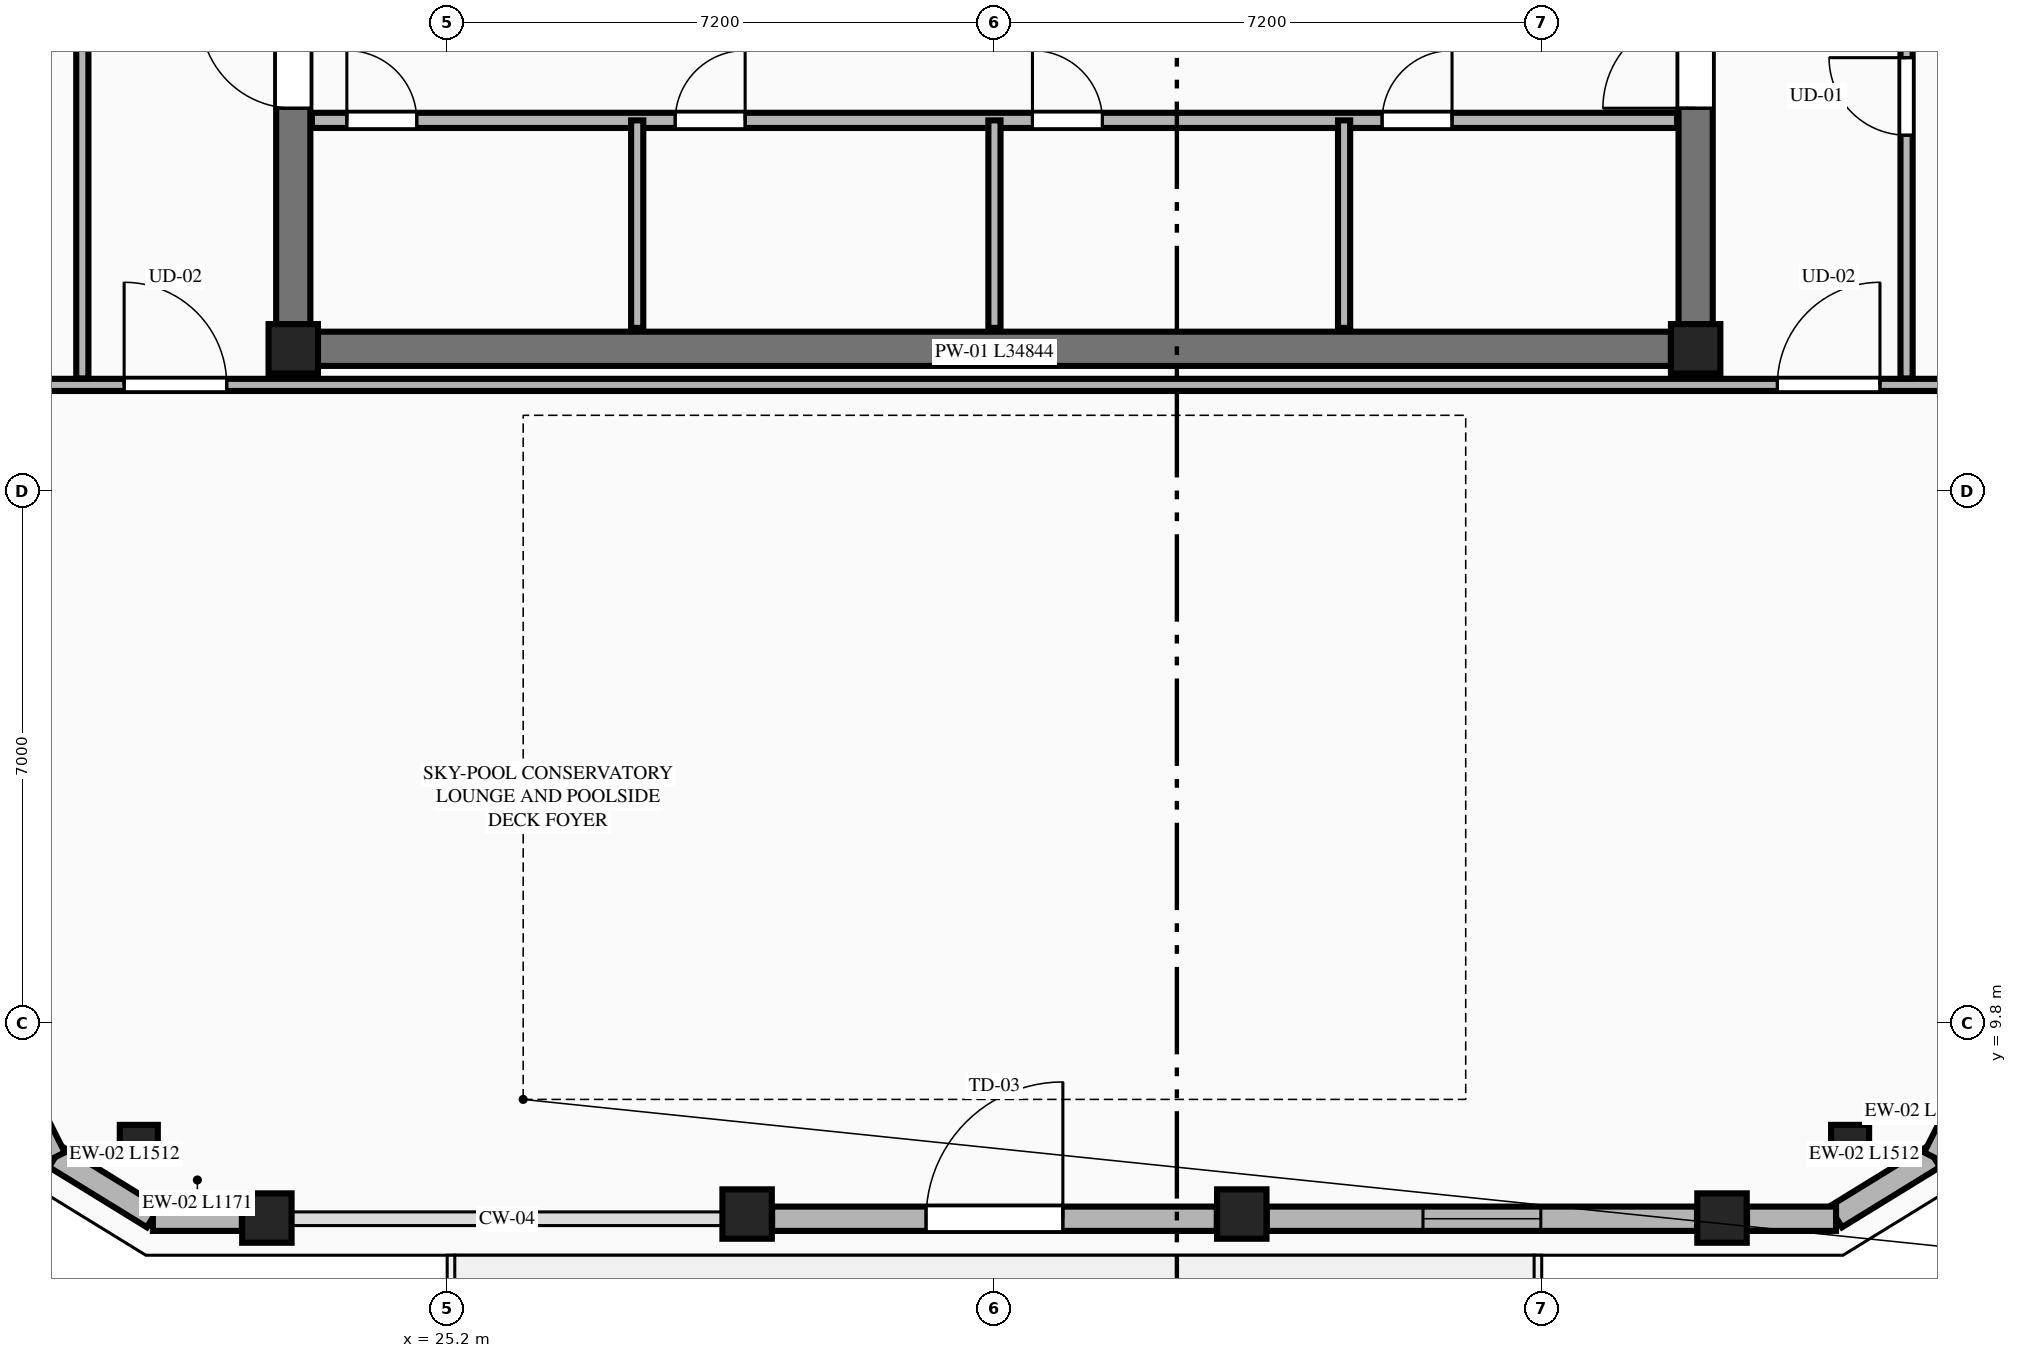
"""IFC4 building model, lengths in metres.
Left out: names, types, materials, properties, quantities, classifications, styles, units other than length and angle.
Written with IfcOpenShell. Run it as: python <this file> out.ifc"""

import sys

from ifc_helpers import new_model, si_unit, direction, frame, frame_2d, origin, origin_2d, place, context, subcontext, project, spatial, rectangle, extrude, element, fill, save


model = new_model("IFC4")
c1 = context("Model", 3, precision=1e-05, world=origin(), true_north=direction((0.0, 1.0)))
c2 = subcontext(c1, "Body", "Model", "MODEL_VIEW")
j1 = project(units=[si_unit("LENGTHUNIT", "METRE"), si_unit("PLANEANGLEUNIT", "RADIAN")], contexts=[c1])
p1 = place(None, origin())
s1 = spatial("IfcSite", under=j1, at=p1, CompositionType="ELEMENT")
p2 = place(p1, origin())
s2 = spatial("IfcBuilding", under=s1, at=p2, CompositionType="ELEMENT")
p3 = place(p2, frame((0.0, 0.0, 278.1)))
s3 = spatial("IfcBuildingStorey", under=s2, at=p3, CompositionType="ELEMENT", Elevation=278.1)
for number, where, z_axis, x_axis in (
    (1, (23.175, 18.675, 0.0), (0.0, 0.0, 1.0), (1.0, 0.0, 0.0)),
    (2, (41.625, 18.675, 0.0), (0.0, 0.0, 1.0), (1.0, 0.0, 0.0)),
):
    element("IfcColumn", number, at=place(p3, frame(where, z_axis=z_axis, x_axis=x_axis)), inside=s3, PredefinedType="COLUMN", context=c2, shape_type="SweptSolid", body=[
        extrude(rectangle(XDim=0.65, YDim=0.65, at=origin_2d()), origin(), (0.0, 0.0, 1.0), 5.4),
    ])
p4 = place(p3, frame((23.5, 18.675, 0.0), z_axis=(0.0, 0.0, 1.0), x_axis=(1.0, 0.0, 0.0)))
e3 = element("IfcWall", 3, at=p4, inside=s3, PredefinedType="SHEAR", context=c2, shape_type="SweptSolid", body=[
    extrude(rectangle(XDim=17.8, YDim=0.45, at=frame_2d((8.9, 0.0))), origin(), (0.0, 0.0, 1.0), 5.2),
])
p5 = place(p3, frame((23.175, 19.0, 0.0), z_axis=(0.0, 0.0, 1.0), x_axis=(0.0, 1.0, 0.0)))
e4 = element("IfcWall", 4, at=p5, inside=s3, PredefinedType="SHEAR", context=c2, shape_type="SweptSolid", body=[
    extrude(rectangle(XDim=13.8, YDim=0.45, at=frame_2d((6.9, 0.0))), origin(), (0.0, 0.0, 1.0), 5.2),
])
p6 = place(p5, frame((2.84, 0.0, 0.0)))
e5 = element("IfcOpeningElement", 5, at=p6, cuts=e4, PredefinedType="OPENING", context=c2, shape_type="SweptSolid", body=[
    extrude(rectangle(XDim=1.22, YDim=2.25, at=frame_2d((0.61, 1.125))), frame((0.0, 0.235, 0.0), z_axis=(0.0, -1.0, 0.0), x_axis=(1.0, 0.0, 0.0)), (0.0, 0.0, 1.0), 0.47),
])
p7 = place(p3, frame((41.625, 19.0, 0.0), z_axis=(0.0, 0.0, 1.0), x_axis=(0.0, 1.0, 0.0)))
e6 = element("IfcWall", 6, at=p7, inside=s3, PredefinedType="SHEAR", context=c2, shape_type="SweptSolid", body=[
    extrude(rectangle(XDim=13.8, YDim=0.45, at=frame_2d((6.9, 0.0))), origin(), (0.0, 0.0, 1.0), 5.2),
])
p8 = place(p7, frame((2.84, 0.0, 0.0)))
e7 = element("IfcOpeningElement", 7, at=p8, cuts=e6, PredefinedType="OPENING", context=c2, shape_type="SweptSolid", body=[
    extrude(rectangle(XDim=1.22, YDim=2.25, at=frame_2d((0.61, 1.125))), frame((0.0, 0.235, 0.0), z_axis=(0.0, -1.0, 0.0), x_axis=(1.0, 0.0, 0.0)), (0.0, 0.0, 1.0), 0.47),
])
for number, where, z_axis, x_axis in (
    (8, (22.828, 7.239, 0.0), (0.0, 0.0, 1.0), (1.0, 0.0, 0.0)),
    (9, (29.146, 7.292, 0.0), (0.0, 0.0, 1.0), (1.0, 0.0, 0.0)),
    (10, (35.654, 7.292, 0.0), (0.0, 0.0, 1.0), (1.0, 0.0, 0.0)),
    (11, (41.972, 7.239, 0.0), (0.0, 0.0, 1.0), (1.0, 0.0, 0.0)),
):
    element("IfcColumn", number, at=place(p3, frame(where, z_axis=z_axis, x_axis=x_axis)), inside=s3, PredefinedType="COLUMN", context=c2, shape_type="SweptSolid", body=[
        extrude(rectangle(XDim=0.65, YDim=0.65, at=origin_2d()), origin(), (0.0, 0.0, 1.0), 5.4),
    ])
for number, where, z_axis, x_axis in (
    (12, (21.143, 8.215, 0.0), (0.0, 0.0, 1.0), (0.865, -0.501, 0.0)),
    (13, (43.657, 8.215, 0.0), (0.0, 0.0, 1.0), (0.865, 0.501, 0.0)),
):
    element("IfcColumn", number, at=place(p3, frame(where, z_axis=z_axis, x_axis=x_axis)), inside=s3, PredefinedType="PILASTER", context=c2, shape_type="SweptSolid", body=[
        extrude(rectangle(XDim=0.5, YDim=0.35, at=origin_2d()), origin(), (0.0, 0.0, 1.0), 5.4),
    ])
p9 = place(p3, frame((23.42, 21.68, 0.0), z_axis=(0.0, 0.0, 1.0), x_axis=(1.0, 0.0, 0.0)))
e14 = element("IfcWall", 14, at=p9, inside=s3, PredefinedType="PLUMBINGWALL", context=c2, shape_type="SweptSolid", body=[
    extrude(rectangle(XDim=17.96, YDim=0.2, at=frame_2d((8.98, 0.0))), origin(), (0.0, 0.0, 1.0), 5.2),
])
p10 = place(p9, frame((0.46, 0.0, 0.0)))
e15 = element("IfcOpeningElement", 15, at=p10, cuts=e14, PredefinedType="OPENING", context=c2, shape_type="SweptSolid", body=[
    extrude(rectangle(XDim=0.92, YDim=2.15, at=frame_2d((0.46, 1.075))), frame((0.0, 0.11, 0.0), z_axis=(0.0, -1.0, 0.0), x_axis=(1.0, 0.0, 0.0)), (0.0, 0.0, 1.0), 0.22),
])
p11 = place(p9, frame((4.78, 0.0, 0.0)))
e16 = element("IfcOpeningElement", 16, at=p11, cuts=e14, PredefinedType="OPENING", context=c2, shape_type="SweptSolid", body=[
    extrude(rectangle(XDim=0.92, YDim=2.15, at=frame_2d((0.46, 1.075))), frame((0.0, 0.11, 0.0), z_axis=(0.0, -1.0, 0.0), x_axis=(1.0, 0.0, 0.0)), (0.0, 0.0, 1.0), 0.22),
])
p12 = place(p9, frame((9.48, 0.0, 0.0)))
e17 = element("IfcOpeningElement", 17, at=p12, cuts=e14, PredefinedType="OPENING", context=c2, shape_type="SweptSolid", body=[
    extrude(rectangle(XDim=0.92, YDim=2.15, at=frame_2d((0.46, 1.075))), frame((0.0, 0.11, 0.0), z_axis=(0.0, -1.0, 0.0), x_axis=(1.0, 0.0, 0.0)), (0.0, 0.0, 1.0), 0.22),
])
p13 = place(p9, frame((14.08, 0.0, 0.0)))
e18 = element("IfcOpeningElement", 18, at=p13, cuts=e14, PredefinedType="OPENING", context=c2, shape_type="SweptSolid", body=[
    extrude(rectangle(XDim=0.92, YDim=2.15, at=frame_2d((0.46, 1.075))), frame((0.0, 0.11, 0.0), z_axis=(0.0, -1.0, 0.0), x_axis=(1.0, 0.0, 0.0)), (0.0, 0.0, 1.0), 0.22),
])
for number, where, z_axis, x_axis in (
    (19, (27.7, 18.95, 0.0), (0.0, 0.0, 1.0), (0.0, 1.0, 0.0)),
    (20, (32.4, 18.95, 0.0), (0.0, 0.0, 1.0), (0.0, 1.0, 0.0)),
    (21, (37.0, 18.95, 0.0), (0.0, 0.0, 1.0), (0.0, 1.0, 0.0)),
):
    element("IfcWall", number, at=place(p3, frame(where, z_axis=z_axis, x_axis=x_axis)), inside=s3, PredefinedType="PARTITIONING", context=c2, shape_type="SweptSolid", body=[
        extrude(rectangle(XDim=2.73, YDim=0.16, at=frame_2d((1.365, 0.0))), origin(), (0.0, 0.0, 1.0), 5.2),
    ])
p14 = place(p3, frame((14.978, 18.2, 0.0), z_axis=(0.0, 0.0, 1.0), x_axis=(1.0, 0.0, 0.0)))
e22 = element("IfcWall", 22, at=p14, inside=s3, PredefinedType="PARTITIONING", context=c2, shape_type="SweptSolid", body=[
    extrude(rectangle(XDim=34.844, YDim=0.16, at=frame_2d((17.422, 0.0))), origin(), (0.0, 0.0, 1.0), 5.2),
])
p15 = place(p14, frame((5.972, 0.0, 0.0)))
e23 = element("IfcOpeningElement", 23, at=p15, cuts=e22, PredefinedType="OPENING", context=c2, shape_type="SweptSolid", body=[
    extrude(rectangle(XDim=1.35, YDim=2.35, at=frame_2d((0.675, 1.175))), frame((0.0, 0.09, 0.0), z_axis=(0.0, -1.0, 0.0), x_axis=(1.0, 0.0, 0.0)), (0.0, 0.0, 1.0), 0.18),
])
p16 = place(p14, frame((27.722, 0.0, 0.0)))
e24 = element("IfcOpeningElement", 24, at=p16, cuts=e22, PredefinedType="OPENING", context=c2, shape_type="SweptSolid", body=[
    extrude(rectangle(XDim=1.35, YDim=2.35, at=frame_2d((0.675, 1.175))), frame((0.0, 0.09, 0.0), z_axis=(0.0, -1.0, 0.0), x_axis=(1.0, 0.0, 0.0)), (0.0, 0.0, 1.0), 0.18),
])
p17 = place(p3, frame((20.4, 18.285, 0.0), z_axis=(0.0, 0.0, 1.0), x_axis=(0.0, 1.0, 0.0)))
e25 = element("IfcWall", 25, at=p17, inside=s3, PredefinedType="PARTITIONING", context=c2, shape_type="SweptSolid", body=[
    extrude(rectangle(XDim=15.23, YDim=0.16, at=frame_2d((7.615, 0.0))), origin(), (0.0, 0.0, 1.0), 4.887),
])
p18 = place(p17, frame((5.5, 0.0, 0.0)))
e26 = element("IfcOpeningElement", 26, at=p18, cuts=e25, PredefinedType="OPENING", context=c2, shape_type="SweptSolid", body=[
    extrude(rectangle(XDim=1.35, YDim=2.35, at=frame_2d((0.675, 1.175))), frame((0.0, 0.09, 0.0), z_axis=(0.0, -1.0, 0.0), x_axis=(1.0, 0.0, 0.0)), (0.0, 0.0, 1.0), 0.18),
])
p19 = place(p3, frame((44.4, 18.285, 0.0), z_axis=(0.0, 0.0, 1.0), x_axis=(0.0, 1.0, 0.0)))
e27 = element("IfcWall", 27, at=p19, inside=s3, PredefinedType="PARTITIONING", context=c2, shape_type="SweptSolid", body=[
    extrude(rectangle(XDim=15.23, YDim=0.16, at=frame_2d((7.615, 0.0))), origin(), (0.0, 0.0, 1.0), 4.887),
])
p20 = place(p19, frame((3.2, 0.0, 0.0)))
e28 = element("IfcOpeningElement", 28, at=p20, cuts=e27, PredefinedType="OPENING", context=c2, shape_type="SweptSolid", body=[
    extrude(rectangle(XDim=1.02, YDim=2.25, at=frame_2d((0.51, 1.125))), frame((0.0, 0.09, 0.0), z_axis=(0.0, -1.0, 0.0), x_axis=(1.0, 0.0, 0.0)), (0.0, 0.0, 1.0), 0.18),
])
p21 = place(p19, frame((10.1, 0.0, 0.0)))
e29 = element("IfcOpeningElement", 29, at=p21, cuts=e27, PredefinedType="OPENING", context=c2, shape_type="SweptSolid", body=[
    extrude(rectangle(XDim=0.86, YDim=2.1, at=frame_2d((0.43, 1.05))), frame((0.0, 0.09, 0.0), z_axis=(0.0, -1.0, 0.0), x_axis=(1.0, 0.0, 0.0)), (0.0, 0.0, 1.0), 0.18),
])
p22 = place(p19, frame((13.0, 0.0, 0.0)))
e30 = element("IfcOpeningElement", 30, at=p22, cuts=e27, PredefinedType="OPENING", context=c2, shape_type="SweptSolid", body=[
    extrude(rectangle(XDim=0.96, YDim=2.15, at=frame_2d((0.48, 1.075))), frame((0.0, 0.09, 0.0), z_axis=(0.0, -1.0, 0.0), x_axis=(1.0, 0.0, 0.0)), (0.0, 0.0, 1.0), 0.18),
])
p23 = place(p3, frame((20.045, 8.046, 0.0), z_axis=(0.0, 0.0, 1.0), x_axis=(0.851857826631, -0.523773083698, 0.0)))
e31 = element("IfcWall", 31, at=p23, inside=s3, PredefinedType="STANDARD", context=c2, shape_type="SweptSolid", body=[
    extrude(rectangle(XDim=1.512, YDim=0.32, at=frame_2d((0.756, 0.0))), origin(), (0.0, 0.0, 1.0), 5.2),
])
p24 = place(p3, frame((43.467, 7.254, 0.0), z_axis=(0.0, 0.0, 1.0), x_axis=(0.851813523106, 0.523845131555, 0.0)))
e32 = element("IfcWall", 32, at=p24, inside=s3, PredefinedType="STANDARD", context=c2, shape_type="SweptSolid", body=[
    extrude(rectangle(XDim=1.512, YDim=0.32, at=frame_2d((0.756, 0.0))), origin(), (0.0, 0.0, 1.0), 5.2),
])
p25 = place(p3, frame((21.328, 7.23, 0.0), z_axis=(0.0, 0.0, 1.0), x_axis=(1.0, 0.0, 0.0)))
e33 = element("IfcWall", 33, at=p25, inside=s3, PredefinedType="STANDARD", context=c2, shape_type="SweptSolid", body=[
    extrude(rectangle(XDim=1.171, YDim=0.32, at=frame_2d((0.585, 0.0))), origin(), (0.0, 0.0, 1.0), 5.2),
])
p26 = place(p3, frame((29.475, 7.23, 0.0), z_axis=(0.0, 0.0, 1.0), x_axis=(1.0, 0.0, 0.0)))
e34 = element("IfcWall", 34, at=p26, inside=s3, PredefinedType="STANDARD", context=c2, shape_type="SweptSolid", body=[
    extrude(rectangle(XDim=5.85, YDim=0.32, at=frame_2d((2.925, 0.0))), origin(), (0.0, 0.0, 1.0), 4.39),
])
p27 = place(p26, frame((2.025, 0.0, 0.0)))
e35 = element("IfcOpeningElement", 35, at=p27, cuts=e34, PredefinedType="OPENING", context=c2, shape_type="SweptSolid", body=[
    extrude(rectangle(XDim=1.8, YDim=2.4, at=frame_2d((0.9, 1.2))), frame((0.0, 0.17, 0.0), z_axis=(0.0, -1.0, 0.0), x_axis=(1.0, 0.0, 0.0)), (0.0, 0.0, 1.0), 0.34),
])
p28 = place(p3, frame((35.983, 7.23, 0.0), z_axis=(0.0, 0.0, 1.0), x_axis=(1.0, 0.0, 0.0)))
e36 = element("IfcWall", 36, at=p28, inside=s3, PredefinedType="STANDARD", context=c2, shape_type="SweptSolid", body=[
    extrude(rectangle(XDim=5.66, YDim=0.32, at=frame_2d((2.83, 0.0))), origin(), (0.0, 0.0, 1.0), 4.39),
])
p29 = place(p28, frame((2.055, 0.0, 0.75)))
e37 = element("IfcOpeningElement", 37, at=p29, cuts=e36, PredefinedType="OPENING", context=c2, shape_type="SweptSolid", body=[
    extrude(rectangle(XDim=1.55, YDim=2.05, at=frame_2d((0.775, 1.025))), frame((0.0, 0.17, 0.0), z_axis=(0.0, -1.0, 0.0), x_axis=(1.0, 0.0, 0.0)), (0.0, 0.0, 1.0), 0.34),
])
p30 = place(p3, frame((42.301, 7.23, 0.0), z_axis=(0.0, 0.0, 1.0), x_axis=(1.0, 0.0, 0.0)))
e38 = element("IfcWall", 38, at=p30, inside=s3, PredefinedType="STANDARD", context=c2, shape_type="SweptSolid", body=[
    extrude(rectangle(XDim=1.171, YDim=0.32, at=frame_2d((0.585, 0.0))), origin(), (0.0, 0.0, 1.0), 5.2),
])
for number, where, z_axis, x_axis in (
    (39, (44.774, 8.031, 0.0), (0.0, 0.0, 1.0), (0.451, 0.892, 0.0)),
    (40, (19.642, 8.79, 0.0), (0.0, 0.0, 1.0), (0.451, -0.892, 0.0)),
):
    element("IfcWall", number, at=place(p3, frame(where, z_axis=z_axis, x_axis=x_axis)), inside=s3, PredefinedType="STANDARD", context=c2, shape_type="SweptSolid", body=[
        extrude(rectangle(XDim=0.851, YDim=0.32, at=frame_2d((0.425, 0.0))), origin(), (0.0, 0.0, 1.0), 5.2),
    ])
p31 = place(p6, origin())
e41 = element("IfcDoor", 41, at=p31, inside=s3, OperationType="SINGLE_SWING_RIGHT", PredefinedType="DOOR", context=c2, shape_type="SweptSolid", body=[
    extrude(rectangle(XDim=1.22, YDim=2.25, at=frame_2d((0.61, 1.125))), frame((0.0, 0.025, 0.0), z_axis=(0.0, -1.0, 0.0), x_axis=(1.0, 0.0, 0.0)), (0.0, 0.0, 1.0), 0.05),
])
fill(e5, e41)
p32 = place(p8, origin())
e42 = element("IfcDoor", 42, at=p32, inside=s3, OperationType="SINGLE_SWING_LEFT", PredefinedType="DOOR", context=c2, shape_type="SweptSolid", body=[
    extrude(rectangle(XDim=1.22, YDim=2.25, at=frame_2d((0.61, 1.125))), frame((0.0, 0.025, 0.0), z_axis=(0.0, -1.0, 0.0), x_axis=(1.0, 0.0, 0.0)), (0.0, 0.0, 1.0), 0.05),
])
fill(e7, e42)
p33 = place(p10, origin())
e43 = element("IfcDoor", 43, at=p33, inside=s3, OperationType="SINGLE_SWING_LEFT", PredefinedType="DOOR", context=c2, shape_type="SweptSolid", body=[
    extrude(rectangle(XDim=0.92, YDim=2.15, at=frame_2d((0.46, 1.075))), frame((0.0, 0.025, 0.0), z_axis=(0.0, -1.0, 0.0), x_axis=(1.0, 0.0, 0.0)), (0.0, 0.0, 1.0), 0.05),
])
fill(e15, e43)
p34 = place(p11, origin())
e44 = element("IfcDoor", 44, at=p34, inside=s3, OperationType="SINGLE_SWING_RIGHT", PredefinedType="DOOR", context=c2, shape_type="SweptSolid", body=[
    extrude(rectangle(XDim=0.92, YDim=2.15, at=frame_2d((0.46, 1.075))), frame((0.0, 0.025, 0.0), z_axis=(0.0, -1.0, 0.0), x_axis=(1.0, 0.0, 0.0)), (0.0, 0.0, 1.0), 0.05),
])
fill(e16, e44)
p35 = place(p12, origin())
e45 = element("IfcDoor", 45, at=p35, inside=s3, OperationType="SINGLE_SWING_LEFT", PredefinedType="DOOR", context=c2, shape_type="SweptSolid", body=[
    extrude(rectangle(XDim=0.92, YDim=2.15, at=frame_2d((0.46, 1.075))), frame((0.0, 0.025, 0.0), z_axis=(0.0, -1.0, 0.0), x_axis=(1.0, 0.0, 0.0)), (0.0, 0.0, 1.0), 0.05),
])
fill(e17, e45)
p36 = place(p13, origin())
e46 = element("IfcDoor", 46, at=p36, inside=s3, OperationType="SINGLE_SWING_RIGHT", PredefinedType="DOOR", context=c2, shape_type="SweptSolid", body=[
    extrude(rectangle(XDim=0.92, YDim=2.15, at=frame_2d((0.46, 1.075))), frame((0.0, 0.025, 0.0), z_axis=(0.0, -1.0, 0.0), x_axis=(1.0, 0.0, 0.0)), (0.0, 0.0, 1.0), 0.05),
])
fill(e18, e46)
p37 = place(p15, origin())
e47 = element("IfcDoor", 47, at=p37, inside=s3, OperationType="SINGLE_SWING_LEFT", PredefinedType="DOOR", context=c2, shape_type="SweptSolid", body=[
    extrude(rectangle(XDim=1.35, YDim=2.35, at=frame_2d((0.675, 1.175))), frame((0.0, 0.025, 0.0), z_axis=(0.0, -1.0, 0.0), x_axis=(1.0, 0.0, 0.0)), (0.0, 0.0, 1.0), 0.05),
])
fill(e23, e47)
p38 = place(p16, origin())
e48 = element("IfcDoor", 48, at=p38, inside=s3, OperationType="SINGLE_SWING_RIGHT", PredefinedType="DOOR", context=c2, shape_type="SweptSolid", body=[
    extrude(rectangle(XDim=1.35, YDim=2.35, at=frame_2d((0.675, 1.175))), frame((0.0, 0.025, 0.0), z_axis=(0.0, -1.0, 0.0), x_axis=(1.0, 0.0, 0.0)), (0.0, 0.0, 1.0), 0.05),
])
fill(e24, e48)
p39 = place(p20, origin())
e49 = element("IfcDoor", 49, at=p39, inside=s3, OperationType="SINGLE_SWING_RIGHT", PredefinedType="DOOR", context=c2, shape_type="SweptSolid", body=[
    extrude(rectangle(XDim=1.02, YDim=2.25, at=frame_2d((0.51, 1.125))), frame((0.0, 0.025, 0.0), z_axis=(0.0, -1.0, 0.0), x_axis=(1.0, 0.0, 0.0)), (0.0, 0.0, 1.0), 0.05),
])
fill(e28, e49)
p40 = place(p27, origin())
e50 = element("IfcDoor", 50, at=p40, inside=s3, OperationType="SINGLE_SWING_RIGHT", PredefinedType="DOOR", context=c2, shape_type="SweptSolid", body=[
    extrude(rectangle(XDim=1.8, YDim=2.4, at=frame_2d((0.9, 1.2))), frame((0.0, 0.025, 0.0), z_axis=(0.0, -1.0, 0.0), x_axis=(1.0, 0.0, 0.0)), (0.0, 0.0, 1.0), 0.05),
])
fill(e35, e50)
p41 = place(p29, origin())
e51 = element("IfcWindow", 51, at=p41, inside=s3, PartitioningType="SINGLE_PANEL", PredefinedType="WINDOW", context=c2, shape_type="SweptSolid", body=[
    extrude(rectangle(XDim=1.55, YDim=2.05, at=frame_2d((0.775, 1.025))), frame((0.0, 0.03, 0.0), z_axis=(0.0, -1.0, 0.0), x_axis=(1.0, 0.0, 0.0)), (0.0, 0.0, 1.0), 0.06),
])
fill(e37, e51)
save(model, sys.argv[1])
